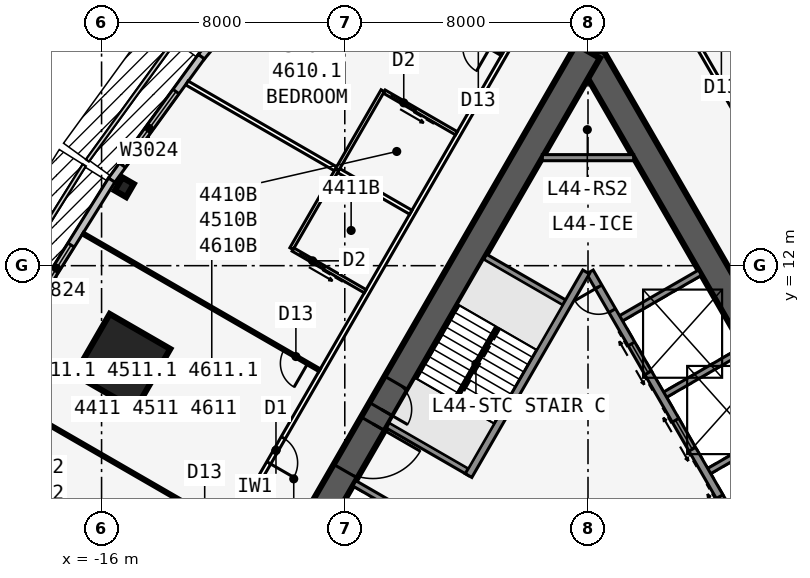
"""IFC4 building model, lengths in metres.
Left out: names, types, materials, properties, quantities, classifications, styles, units other than length and angle.
Written with IfcOpenShell. Run it as: python <this file> out.ifc"""

import sys

from ifc_helpers import new_model, si_unit, direction, frame, frame_2d, origin, origin_2d, place, context, subcontext, project, spatial, rectangle, i_section, extrude, element, fill, save


model = new_model("IFC4")
c1 = context("Model", 3, precision=1e-05, world=origin(), true_north=direction((0.0, 1.0)))
c2 = subcontext(c1, "Body", "Model", "MODEL_VIEW")
j1 = project(units=[si_unit("LENGTHUNIT", "METRE"), si_unit("PLANEANGLEUNIT", "RADIAN")], contexts=[c1])
p1 = place(None, origin())
s1 = spatial("IfcSite", under=j1, at=p1, CompositionType="ELEMENT")
p2 = place(p1, origin())
s2 = spatial("IfcBuilding", under=s1, at=p2, CompositionType="ELEMENT")
p3 = place(p2, frame((0.0, 0.0, 165.7)))
s3 = spatial("IfcBuildingStorey", under=s2, at=p3, CompositionType="ELEMENT", Elevation=165.7)
p4 = place(p3, frame((16.5, -9.526, 0.0), z_axis=(0.0, 0.0, 1.0), x_axis=(-0.499999749417, 0.866025548458, 0.0)))
e1 = element("IfcWall", 1, at=p4, inside=s3, PredefinedType="SHEAR", context=c2, shape_type="SweptSolid", body=[
    extrude(rectangle(XDim=33.0, YDim=0.9, at=frame_2d((16.5, 0.0))), origin(), (0.0, 0.0, 1.0), 3.4),
])
p5 = place(p4, frame((14.15, 0.0, 0.0)))
e2 = element("IfcOpeningElement", 2, at=p5, cuts=e1, PredefinedType="OPENING", context=c2, shape_type="SweptSolid", body=[
    extrude(rectangle(XDim=1.8, YDim=2.13, at=frame_2d((0.9, 1.065))), frame((0.0, 0.46, 0.0), z_axis=(0.0, -1.0, 0.0), x_axis=(1.0, 0.0, 0.0)), (0.0, 0.0, 1.0), 0.92),
])
p6 = place(p4, frame((12.6, 0.0, 0.0)))
e3 = element("IfcOpeningElement", 3, at=p6, cuts=e1, PredefinedType="OPENING", context=c2, shape_type="SweptSolid", body=[
    extrude(rectangle(XDim=1.0, YDim=2.13, at=frame_2d((0.5, 1.065))), frame((0.0, 0.46, 0.0), z_axis=(0.0, -1.0, 0.0), x_axis=(1.0, 0.0, 0.0)), (0.0, 0.0, 1.0), 0.92),
])
p7 = place(p3, frame((5.379, 2.586, 0.0), z_axis=(0.0, 0.0, 1.0), x_axis=(-0.500001375892, 0.866024609411, 0.0)))
e4 = element("IfcWall", 4, at=p7, inside=s3, PredefinedType="SOLIDWALL", context=c2, shape_type="SweptSolid", body=[
    extrude(rectangle(XDim=10.633, YDim=0.25, at=frame_2d((5.316, 0.0))), origin(), (0.0, 0.0, 1.0), 3.235),
])
p8 = place(p7, frame((9.164, 0.0, 0.0)))
e5 = element("IfcOpeningElement", 5, at=p8, cuts=e4, PredefinedType="OPENING", context=c2, shape_type="SweptSolid", body=[
    extrude(rectangle(XDim=0.9, YDim=2.13, at=frame_2d((0.45, 1.065))), frame((0.0, 0.135, 0.0), z_axis=(0.0, -1.0, 0.0), x_axis=(1.0, 0.0, 0.0)), (0.0, 0.0, 1.0), 0.27),
])
p9 = place(p7, frame((1.0, 0.0, 0.0)))
e6 = element("IfcOpeningElement", 6, at=p9, cuts=e4, PredefinedType="OPENING", context=c2, shape_type="SweptSolid", body=[
    extrude(rectangle(XDim=1.1, YDim=2.13, at=frame_2d((0.55, 1.065))), frame((0.0, 0.135, 0.0), z_axis=(0.0, -1.0, 0.0), x_axis=(1.0, 0.0, 0.0)), (0.0, 0.0, 1.0), 0.27),
])
p10 = place(p7, frame((3.9, 0.0, 0.0)))
e7 = element("IfcOpeningElement", 7, at=p10, cuts=e4, PredefinedType="OPENING", context=c2, shape_type="SweptSolid", body=[
    extrude(rectangle(XDim=1.1, YDim=2.13, at=frame_2d((0.55, 1.065))), frame((0.0, 0.135, 0.0), z_axis=(0.0, -1.0, 0.0), x_axis=(1.0, 0.0, 0.0)), (0.0, 0.0, 1.0), 0.27),
])
p11 = place(p7, frame((6.8, 0.0, 0.0)))
e8 = element("IfcOpeningElement", 8, at=p11, cuts=e4, PredefinedType="OPENING", context=c2, shape_type="SweptSolid", body=[
    extrude(rectangle(XDim=1.1, YDim=2.13, at=frame_2d((0.55, 1.065))), frame((0.0, 0.135, 0.0), z_axis=(0.0, -1.0, 0.0), x_axis=(1.0, 0.0, 0.0)), (0.0, 0.0, 1.0), 0.27),
])
for number, where, z_axis, x_axis in (
    (9, (3.879, 5.184, 0.0), (0.0, 0.0, 1.0), (0.866, 0.5, 0.0)),
    (10, (2.429, 7.696, 0.0), (0.0, 0.0, 1.0), (0.866, 0.5, 0.0)),
    (11, (0.979, 10.207, 0.0), (0.0, 0.0, 1.0), (0.866, 0.5, 0.0)),
):
    element("IfcWall", number, at=place(p3, frame(where, z_axis=z_axis, x_axis=x_axis)), inside=s3, PredefinedType="SOLIDWALL", context=c2, shape_type="SweptSolid", body=[
        extrude(rectangle(XDim=3.125, YDim=0.2, at=frame_2d((1.562, 0.0))), origin(), (0.0, 0.0, 1.0), 3.235),
    ])
p12 = place(p3, frame((0.0, 19.052, 0.0), z_axis=(0.0, 0.0, 1.0), x_axis=(-0.499999749417, -0.866025548458, 0.0)))
e12 = element("IfcWall", 12, at=p12, inside=s3, PredefinedType="SHEAR", context=c2, shape_type="SweptSolid", body=[
    extrude(rectangle(XDim=33.0, YDim=0.9, at=frame_2d((16.5, 0.0))), origin(), (0.0, 0.0, 1.0), 3.4),
])
p13 = place(p12, frame((14.15, 0.0, 0.0)))
e13 = element("IfcOpeningElement", 13, at=p13, cuts=e12, PredefinedType="OPENING", context=c2, shape_type="SweptSolid", body=[
    extrude(rectangle(XDim=1.8, YDim=2.13, at=frame_2d((0.9, 1.065))), frame((0.0, 0.46, 0.0), z_axis=(0.0, -1.0, 0.0), x_axis=(1.0, 0.0, 0.0)), (0.0, 0.0, 1.0), 0.92),
])
p14 = place(p12, frame((12.6, 0.0, 0.0)))
e14 = element("IfcOpeningElement", 14, at=p14, cuts=e12, PredefinedType="OPENING", context=c2, shape_type="SweptSolid", body=[
    extrude(rectangle(XDim=1.0, YDim=2.13, at=frame_2d((0.5, 1.065))), frame((0.0, 0.46, 0.0), z_axis=(0.0, -1.0, 0.0), x_axis=(1.0, 0.0, 0.0)), (0.0, 0.0, 1.0), 0.92),
])
p15 = place(p3, frame((-0.062, 11.794, 0.0), z_axis=(0.0, 0.0, 1.0), x_axis=(-0.500006680225, -0.86602154692, 0.0)))
e15 = element("IfcWall", 15, at=p15, inside=s3, PredefinedType="SOLIDWALL", context=c2, shape_type="SweptSolid", body=[
    extrude(rectangle(XDim=7.733, YDim=0.25, at=frame_2d((3.866, 0.0))), origin(), (0.0, 0.0, 1.0), 3.235),
])
for number, where, z_axis, x_axis in (
    (16, (-0.679, 10.727, 0.0), (0.0, 0.0, 1.0), (-0.866, 0.5, 0.0)),
    (17, (-3.879, 5.184, 0.0), (0.0, 0.0, 1.0), (-0.866, 0.5, 0.0)),
    (18, (-4.979, 3.279, 0.0), (0.0, 0.0, 1.0), (-0.866, 0.5, 0.0)),
):
    element("IfcWall", number, at=place(p3, frame(where, z_axis=z_axis, x_axis=x_axis)), inside=s3, PredefinedType="SOLIDWALL", context=c2, shape_type="SweptSolid", body=[
        extrude(rectangle(XDim=3.125, YDim=0.2, at=frame_2d((1.562, 0.0))), origin(), (0.0, 0.0, 1.0), 3.235),
    ])
p16 = place(p3, frame((-15.254, 14.58, 0.0), z_axis=(0.0, 0.0, 1.0), x_axis=(-0.866025403784, 0.5, 0.0)))
e19 = element("IfcColumn", 19, at=p16, inside=s3, PredefinedType="COLUMN", context=c2, shape_type="SweptSolid", body=[
    extrude(i_section(OverallWidth=0.432, OverallDepth=0.498, WebThickness=0.056, FlangeThickness=0.089, at=origin_2d()), origin(), (0.0, 0.0, 1.0), 3.4),
])
p17 = place(p3, frame((-15.312, 8.84, 0.0), z_axis=(0.0, 0.0, 1.0), x_axis=(-0.866025403784, 0.5, 0.0)))
e20 = element("IfcColumn", 20, at=p17, inside=s3, PredefinedType="COLUMN", context=c2, shape_type="SweptSolid", body=[
    extrude(rectangle(XDim=2.3, YDim=2.3, at=origin_2d()), origin(), (0.0, 0.0, 1.0), 3.4),
])
p18 = place(p3, frame((-9.465, 22.76, 0.0), z_axis=(0.0, 0.0, 1.0), x_axis=(-0.641810386606, -0.766863369607, 0.0)))
e21 = element("IfcWall", 21, at=p18, inside=s3, PredefinedType="STANDARD", context=c2, shape_type="SweptSolid", body=[
    extrude(rectangle(XDim=5.076, YDim=0.25, at=frame_2d((2.538, 0.0))), origin(), (0.0, 0.0, 1.0), 3.235),
])
p19 = place(p18, frame((0.738, 0.0, 0.45)))
e22 = element("IfcOpeningElement", 22, at=p19, cuts=e21, PredefinedType="OPENING", context=c2, shape_type="SweptSolid", body=[
    extrude(rectangle(XDim=3.6, YDim=2.4, at=frame_2d((1.8, 1.2))), frame((0.0, 0.135, 0.0), z_axis=(0.0, -1.0, 0.0), x_axis=(1.0, 0.0, 0.0)), (0.0, 0.0, 1.0), 0.27),
])
p20 = place(p3, frame((-12.718, 18.875, 0.0), z_axis=(0.0, 0.0, 1.0), x_axis=(-0.587669188412, -0.809101307001, 0.0)))
e23 = element("IfcWall", 23, at=p20, inside=s3, PredefinedType="STANDARD", context=c2, shape_type="SweptSolid", body=[
    extrude(rectangle(XDim=5.028, YDim=0.25, at=frame_2d((2.514, 0.0))), origin(), (0.0, 0.0, 1.0), 3.235),
])
p21 = place(p20, frame((1.418, 0.0, 0.45)))
e24 = element("IfcOpeningElement", 24, at=p21, cuts=e23, PredefinedType="OPENING", context=c2, shape_type="SweptSolid", body=[
    extrude(rectangle(XDim=3.0, YDim=2.4, at=frame_2d((1.5, 1.2))), frame((0.0, 0.135, 0.0), z_axis=(0.0, -1.0, 0.0), x_axis=(1.0, 0.0, 0.0)), (0.0, 0.0, 1.0), 0.27),
])
p22 = place(p3, frame((-15.667, 14.814, 0.0), z_axis=(0.0, 0.0, 1.0), x_axis=(-0.529990167382, -0.84800378683, 0.0)))
e25 = element("IfcWall", 25, at=p22, inside=s3, PredefinedType="STANDARD", context=c2, shape_type="SweptSolid", body=[
    extrude(rectangle(XDim=5.003, YDim=0.25, at=frame_2d((2.501, 0.0))), origin(), (0.0, 0.0, 1.0), 3.235),
])
p23 = place(p22, frame((2.519, 0.0, 0.45)))
e26 = element("IfcOpeningElement", 26, at=p23, cuts=e25, PredefinedType="OPENING", context=c2, shape_type="SweptSolid", body=[
    extrude(rectangle(XDim=1.8, YDim=2.4, at=frame_2d((0.9, 1.2))), frame((0.0, 0.135, 0.0), z_axis=(0.0, -1.0, 0.0), x_axis=(1.0, 0.0, 0.0)), (0.0, 0.0, 1.0), 0.27),
])
p24 = place(p3, frame((21.586, -11.885, 0.0), z_axis=(0.0, 0.0, 1.0), x_axis=(-0.500001915564, 0.86602429783, 0.0)))
e27 = element("IfcWall", 27, at=p24, inside=s3, PredefinedType="PARTITIONING", context=c2, shape_type="SweptSolid", body=[
    extrude(rectangle(XDim=42.172, YDim=0.15, at=frame_2d((21.086, 0.0))), origin(), (0.0, 0.0, 1.0), 3.235),
])
p25 = place(p24, frame((1.911, 0.0, 0.0)))
e28 = element("IfcOpeningElement", 28, at=p25, cuts=e27, PredefinedType="OPENING", context=c2, shape_type="SweptSolid", body=[
    extrude(rectangle(XDim=0.95, YDim=2.13, at=frame_2d((0.475, 1.065))), frame((0.0, 0.085, 0.0), z_axis=(0.0, -1.0, 0.0), x_axis=(1.0, 0.0, 0.0)), (0.0, 0.0, 1.0), 0.17),
])
p26 = place(p24, frame((9.311, 0.0, 0.0)))
e29 = element("IfcOpeningElement", 29, at=p26, cuts=e27, PredefinedType="OPENING", context=c2, shape_type="SweptSolid", body=[
    extrude(rectangle(XDim=0.95, YDim=2.13, at=frame_2d((0.475, 1.065))), frame((0.0, 0.085, 0.0), z_axis=(0.0, -1.0, 0.0), x_axis=(1.0, 0.0, 0.0)), (0.0, 0.0, 1.0), 0.17),
])
p27 = place(p24, frame((14.611, 0.0, 0.0)))
e30 = element("IfcOpeningElement", 30, at=p27, cuts=e27, PredefinedType="OPENING", context=c2, shape_type="SweptSolid", body=[
    extrude(rectangle(XDim=0.95, YDim=2.13, at=frame_2d((0.475, 1.065))), frame((0.0, 0.085, 0.0), z_axis=(0.0, -1.0, 0.0), x_axis=(1.0, 0.0, 0.0)), (0.0, 0.0, 1.0), 0.17),
])
p28 = place(p24, frame((26.711, 0.0, 0.0)))
e31 = element("IfcOpeningElement", 31, at=p28, cuts=e27, PredefinedType="OPENING", context=c2, shape_type="SweptSolid", body=[
    extrude(rectangle(XDim=0.95, YDim=2.13, at=frame_2d((0.475, 1.065))), frame((0.0, 0.085, 0.0), z_axis=(0.0, -1.0, 0.0), x_axis=(1.0, 0.0, 0.0)), (0.0, 0.0, 1.0), 0.17),
])
p29 = place(p24, frame((38.884, 0.0, 0.0)))
e32 = element("IfcOpeningElement", 32, at=p29, cuts=e27, PredefinedType="OPENING", context=c2, shape_type="SweptSolid", body=[
    extrude(rectangle(XDim=0.95, YDim=2.13, at=frame_2d((0.475, 1.065))), frame((0.0, 0.085, 0.0), z_axis=(0.0, -1.0, 0.0), x_axis=(1.0, 0.0, 0.0)), (0.0, 0.0, 1.0), 0.17),
])
p30 = place(p3, frame((-0.5, 22.836, 0.0), z_axis=(0.0, 0.0, 1.0), x_axis=(-0.500001677587, -0.866024435227, 0.0)))
e33 = element("IfcWall", 33, at=p30, inside=s3, PredefinedType="PARTITIONING", context=c2, shape_type="SweptSolid", body=[
    extrude(rectangle(XDim=39.054, YDim=0.15, at=frame_2d((19.527, 0.0))), origin(), (0.0, 0.0, 1.0), 3.235),
])
p31 = place(p30, frame((1.558, 0.0, 0.0)))
e34 = element("IfcOpeningElement", 34, at=p31, cuts=e33, PredefinedType="OPENING", context=c2, shape_type="SweptSolid", body=[
    extrude(rectangle(XDim=0.95, YDim=2.13, at=frame_2d((0.475, 1.065))), frame((0.0, 0.085, 0.0), z_axis=(0.0, -1.0, 0.0), x_axis=(1.0, 0.0, 0.0)), (0.0, 0.0, 1.0), 0.17),
])
p32 = place(p30, frame((19.052, 0.0, 0.0)))
e35 = element("IfcOpeningElement", 35, at=p32, cuts=e33, PredefinedType="OPENING", context=c2, shape_type="SweptSolid", body=[
    extrude(rectangle(XDim=0.95, YDim=2.13, at=frame_2d((0.475, 1.065))), frame((0.0, 0.085, 0.0), z_axis=(0.0, -1.0, 0.0), x_axis=(1.0, 0.0, 0.0)), (0.0, 0.0, 1.0), 0.17),
])
p33 = place(p30, frame((31.752, 0.0, 0.0)))
e36 = element("IfcOpeningElement", 36, at=p33, cuts=e33, PredefinedType="OPENING", context=c2, shape_type="SweptSolid", body=[
    extrude(rectangle(XDim=0.95, YDim=2.13, at=frame_2d((0.475, 1.065))), frame((0.0, 0.085, 0.0), z_axis=(0.0, -1.0, 0.0), x_axis=(1.0, 0.0, 0.0)), (0.0, 0.0, 1.0), 0.17),
])
p34 = place(p30, frame((37.752, 0.0, 0.0)))
e37 = element("IfcOpeningElement", 37, at=p34, cuts=e33, PredefinedType="OPENING", context=c2, shape_type="SweptSolid", body=[
    extrude(rectangle(XDim=0.95, YDim=2.13, at=frame_2d((0.475, 1.065))), frame((0.0, 0.085, 0.0), z_axis=(0.0, -1.0, 0.0), x_axis=(1.0, 0.0, 0.0)), (0.0, 0.0, 1.0), 0.17),
])
p35 = place(p3, frame((-2.829, 18.954, 0.0), z_axis=(0.0, 0.0, 1.0), x_axis=(-0.866015739374, 0.500016738876, 0.0)))
e38 = element("IfcWall", 38, at=p35, inside=s3, PredefinedType="PARTITIONING", context=c2, shape_type="SweptSolid", body=[
    extrude(rectangle(XDim=7.516, YDim=0.1, at=frame_2d((3.758, 0.0))), origin(), (0.0, 0.0, 1.0), 2.389),
])
p36 = place(p35, frame((0.45, 0.0, 0.0)))
e39 = element("IfcOpeningElement", 39, at=p36, cuts=e38, PredefinedType="OPENING", context=c2, shape_type="SweptSolid", body=[
    extrude(rectangle(XDim=0.9, YDim=2.13, at=frame_2d((0.45, 1.065))), frame((0.0, 0.06, 0.0), z_axis=(0.0, -1.0, 0.0), x_axis=(1.0, 0.0, 0.0)), (0.0, 0.0, 1.0), 0.12),
])
p37 = place(p3, frame((-5.829, 13.757, 0.0), z_axis=(0.0, 0.0, 1.0), x_axis=(-0.866011529155, 0.500024030793, 0.0)))
e40 = element("IfcWall", 40, at=p37, inside=s3, PredefinedType="PARTITIONING", context=c2, shape_type="SweptSolid", body=[
    extrude(rectangle(XDim=8.502, YDim=0.15, at=frame_2d((4.251, 0.0))), origin(), (0.0, 0.0, 1.0), 3.235),
])
p38 = place(p3, frame((-8.829, 8.561, 0.0), z_axis=(0.0, 0.0, 1.0), x_axis=(-0.866021034389, 0.500007567939, 0.0)))
e41 = element("IfcWall", 41, at=p38, inside=s3, PredefinedType="PARTITIONING", context=c2, shape_type="SweptSolid", body=[
    extrude(rectangle(XDim=8.993, YDim=0.1, at=frame_2d((4.497, 0.0))), origin(), (0.0, 0.0, 1.0), 3.235),
])
p39 = place(p38, frame((0.45, 0.0, 0.0)))
e42 = element("IfcOpeningElement", 42, at=p39, cuts=e41, PredefinedType="OPENING", context=c2, shape_type="SweptSolid", body=[
    extrude(rectangle(XDim=0.9, YDim=2.13, at=frame_2d((0.45, 1.065))), frame((0.0, 0.06, 0.0), z_axis=(0.0, -1.0, 0.0), x_axis=(1.0, 0.0, 0.0)), (0.0, 0.0, 1.0), 0.12),
])
p40 = place(p3, frame((-11.829, 3.365, 0.0), z_axis=(0.0, 0.0, 1.0), x_axis=(-0.866009279501, 0.500027927039, 0.0)))
e43 = element("IfcWall", 43, at=p40, inside=s3, PredefinedType="PARTITIONING", context=c2, shape_type="SweptSolid", body=[
    extrude(rectangle(XDim=8.994, YDim=0.1, at=frame_2d((4.497, 0.0))), origin(), (0.0, 0.0, 1.0), 3.235),
])
p41 = place(p40, frame((0.45, 0.0, 0.0)))
e44 = element("IfcOpeningElement", 44, at=p41, cuts=e43, PredefinedType="OPENING", context=c2, shape_type="SweptSolid", body=[
    extrude(rectangle(XDim=0.9, YDim=2.13, at=frame_2d((0.45, 1.065))), frame((0.0, 0.06, 0.0), z_axis=(0.0, -1.0, 0.0), x_axis=(1.0, 0.0, 0.0)), (0.0, 0.0, 1.0), 0.12),
])
p42 = place(p3, frame((-6.753, 17.755, 0.0), z_axis=(0.0, 0.0, 1.0), x_axis=(-0.50002537861, -0.866010750942, 0.0)))
e45 = element("IfcWall", 45, at=p42, inside=s3, PredefinedType="PLUMBINGWALL", context=c2, shape_type="SweptSolid", body=[
    extrude(rectangle(XDim=3.0, YDim=0.12, at=frame_2d((1.5, 0.0))), origin(), (0.0, 0.0, 1.0), 3.235),
])
p43 = place(p3, frame((-4.329, 16.355, 0.0), z_axis=(0.0, 0.0, 1.0), x_axis=(-0.866035715982, 0.499982138324, 0.0)))
e46 = element("IfcWall", 46, at=p43, inside=s3, PredefinedType="PLUMBINGWALL", context=c2, shape_type="SweptSolid", body=[
    extrude(rectangle(XDim=2.74, YDim=0.12, at=frame_2d((1.37, 0.0))), origin(), (0.0, 0.0, 1.0), 3.235),
])
p44 = place(p43, frame((1.55, 0.0, 0.0)))
e47 = element("IfcOpeningElement", 47, at=p44, cuts=e46, PredefinedType="OPENING", context=c2, shape_type="SweptSolid", body=[
    extrude(rectangle(XDim=0.9, YDim=2.13, at=frame_2d((0.45, 1.065))), frame((0.0, 0.07, 0.0), z_axis=(0.0, -1.0, 0.0), x_axis=(1.0, 0.0, 0.0)), (0.0, 0.0, 1.0), 0.14),
])
p45 = place(p3, frame((-8.253, 15.157, 0.0), z_axis=(0.0, 0.0, 1.0), x_axis=(-0.499990139034, -0.866031096941, 0.0)))
e48 = element("IfcWall", 48, at=p45, inside=s3, PredefinedType="PLUMBINGWALL", context=c2, shape_type="SweptSolid", body=[
    extrude(rectangle(XDim=3.0, YDim=0.12, at=frame_2d((1.5, 0.0))), origin(), (0.0, 0.0, 1.0), 3.235),
])
p46 = place(p3, frame((-7.329, 11.159, 0.0), z_axis=(0.0, 0.0, 1.0), x_axis=(-0.865997131366, 0.500048966069, 0.0)))
e49 = element("IfcWall", 49, at=p46, inside=s3, PredefinedType="PLUMBINGWALL", context=c2, shape_type="SweptSolid", body=[
    extrude(rectangle(XDim=2.74, YDim=0.12, at=frame_2d((1.37, 0.0))), origin(), (0.0, 0.0, 1.0), 3.235),
])
p47 = place(p46, frame((1.55, 0.0, 0.0)))
e50 = element("IfcOpeningElement", 50, at=p47, cuts=e49, PredefinedType="OPENING", context=c2, shape_type="SweptSolid", body=[
    extrude(rectangle(XDim=0.9, YDim=2.13, at=frame_2d((0.45, 1.065))), frame((0.0, 0.07, 0.0), z_axis=(0.0, -1.0, 0.0), x_axis=(1.0, 0.0, 0.0)), (0.0, 0.0, 1.0), 0.14),
])
p48 = place(p3, frame((-1.501, 15.552, 0.0), z_axis=(0.0, 0.0, 1.0), x_axis=(1.0, 0.0, 0.0)))
e51 = element("IfcWall", 51, at=p48, inside=s3, PredefinedType="SOLIDWALL", context=c2, shape_type="SweptSolid", body=[
    extrude(rectangle(XDim=3.002, YDim=0.2, at=frame_2d((1.501, 0.0))), origin(), (0.0, 0.0, 1.0), 3.235),
])
p49 = place(p3, frame((-2.988, 9.978, 0.0), z_axis=(0.0, 0.0, 1.0), x_axis=(-0.499992232847, -0.866029888106, 0.0)))
e52 = element("IfcWall", 52, at=p49, inside=s3, PredefinedType="SOLIDWALL", context=c2, shape_type="SweptSolid", body=[
    extrude(rectangle(XDim=2.794, YDim=0.1, at=frame_2d((1.397, 0.0))), origin(), (0.0, 0.0, 1.0), 3.4),
])
p50 = place(p21, origin())
e53 = element("IfcWindow", 53, at=p50, inside=s3, PartitioningType="SINGLE_PANEL", PredefinedType="WINDOW", context=c2, shape_type="SweptSolid", body=[
    extrude(rectangle(XDim=3.0, YDim=2.4, at=frame_2d((1.5, 1.2))), frame((0.0, 0.03, 0.0), z_axis=(0.0, -1.0, 0.0), x_axis=(1.0, 0.0, 0.0)), (0.0, 0.0, 1.0), 0.06),
])
fill(e24, e53)
p51 = place(p23, origin())
e54 = element("IfcWindow", 54, at=p51, inside=s3, PartitioningType="SINGLE_PANEL", PredefinedType="WINDOW", context=c2, shape_type="SweptSolid", body=[
    extrude(rectangle(XDim=1.8, YDim=2.4, at=frame_2d((0.9, 1.2))), frame((0.0, 0.03, 0.0), z_axis=(0.0, -1.0, 0.0), x_axis=(1.0, 0.0, 0.0)), (0.0, 0.0, 1.0), 0.06),
])
fill(e26, e54)
p52 = place(p39, origin())
e55 = element("IfcDoor", 55, at=p52, inside=s3, OperationType="SINGLE_SWING_LEFT", PredefinedType="DOOR", context=c2, shape_type="SweptSolid", body=[
    extrude(rectangle(XDim=0.9, YDim=2.13, at=frame_2d((0.45, 1.065))), frame((0.0, 0.025, 0.0), z_axis=(0.0, -1.0, 0.0), x_axis=(1.0, 0.0, 0.0)), (0.0, 0.0, 1.0), 0.05),
])
fill(e42, e55)
p53 = place(p44, origin())
e56 = element("IfcDoor", 56, at=p53, inside=s3, OperationType="SLIDING_TO_LEFT", PredefinedType="DOOR", context=c2, shape_type="SweptSolid", body=[
    extrude(rectangle(XDim=0.9, YDim=2.13, at=frame_2d((0.45, 1.065))), frame((0.0, 0.025, 0.0), z_axis=(0.0, -1.0, 0.0), x_axis=(1.0, 0.0, 0.0)), (0.0, 0.0, 1.0), 0.05),
])
fill(e47, e56)
p54 = place(p47, origin())
e57 = element("IfcDoor", 57, at=p54, inside=s3, OperationType="SLIDING_TO_LEFT", PredefinedType="DOOR", context=c2, shape_type="SweptSolid", body=[
    extrude(rectangle(XDim=0.9, YDim=2.13, at=frame_2d((0.45, 1.065))), frame((0.0, 0.025, 0.0), z_axis=(0.0, -1.0, 0.0), x_axis=(1.0, 0.0, 0.0)), (0.0, 0.0, 1.0), 0.05),
])
fill(e50, e57)
p55 = place(p32, origin())
e58 = element("IfcDoor", 58, at=p55, inside=s3, OperationType="SINGLE_SWING_RIGHT", PredefinedType="DOOR", context=c2, shape_type="SweptSolid", body=[
    extrude(rectangle(XDim=0.95, YDim=2.13, at=frame_2d((0.475, 1.065))), frame((0.0, 0.025, 0.0), z_axis=(0.0, -1.0, 0.0), x_axis=(1.0, 0.0, 0.0)), (0.0, 0.0, 1.0), 0.05),
])
fill(e35, e58)
p56 = place(p13, origin())
e59 = element("IfcDoor", 59, at=p56, inside=s3, OperationType="DOUBLE_DOOR_SINGLE_SWING", PredefinedType="DOOR", context=c2, shape_type="SweptSolid", body=[
    extrude(rectangle(XDim=1.8, YDim=2.13, at=frame_2d((0.9, 1.065))), frame((0.0, 0.025, 0.0), z_axis=(0.0, -1.0, 0.0), x_axis=(1.0, 0.0, 0.0)), (0.0, 0.0, 1.0), 0.05),
])
fill(e13, e59)
p57 = place(p14, origin())
e60 = element("IfcDoor", 60, at=p57, inside=s3, OperationType="SINGLE_SWING_RIGHT", PredefinedType="DOOR", context=c2, shape_type="SweptSolid", body=[
    extrude(rectangle(XDim=1.0, YDim=2.13, at=frame_2d((0.5, 1.065))), frame((0.0, 0.025, 0.0), z_axis=(0.0, -1.0, 0.0), x_axis=(1.0, 0.0, 0.0)), (0.0, 0.0, 1.0), 0.05),
])
fill(e14, e60)
p58 = place(p8, origin())
e61 = element("IfcDoor", 61, at=p58, inside=s3, OperationType="SINGLE_SWING_RIGHT", PredefinedType="DOOR", context=c2, shape_type="SweptSolid", body=[
    extrude(rectangle(XDim=0.9, YDim=2.13, at=frame_2d((0.45, 1.065))), frame((0.0, 0.025, 0.0), z_axis=(0.0, -1.0, 0.0), x_axis=(1.0, 0.0, 0.0)), (0.0, 0.0, 1.0), 0.05),
])
fill(e5, e61)
p59 = place(p9, origin())
e62 = element("IfcDoor", 62, at=p59, inside=s3, OperationType="DOUBLE_DOOR_SLIDING", PredefinedType="USERDEFINED", context=c2, shape_type="SweptSolid", body=[
    extrude(rectangle(XDim=1.1, YDim=2.13, at=frame_2d((0.55, 1.065))), frame((0.0, 0.025, 0.0), z_axis=(0.0, -1.0, 0.0), x_axis=(1.0, 0.0, 0.0)), (0.0, 0.0, 1.0), 0.05),
])
fill(e6, e62)
p60 = place(p10, origin())
e63 = element("IfcDoor", 63, at=p60, inside=s3, OperationType="DOUBLE_DOOR_SLIDING", PredefinedType="USERDEFINED", context=c2, shape_type="SweptSolid", body=[
    extrude(rectangle(XDim=1.1, YDim=2.13, at=frame_2d((0.55, 1.065))), frame((0.0, 0.025, 0.0), z_axis=(0.0, -1.0, 0.0), x_axis=(1.0, 0.0, 0.0)), (0.0, 0.0, 1.0), 0.05),
])
fill(e7, e63)
p61 = place(p11, origin())
e64 = element("IfcDoor", 64, at=p61, inside=s3, OperationType="DOUBLE_DOOR_SLIDING", PredefinedType="USERDEFINED", context=c2, shape_type="SweptSolid", body=[
    extrude(rectangle(XDim=1.1, YDim=2.13, at=frame_2d((0.55, 1.065))), frame((0.0, 0.025, 0.0), z_axis=(0.0, -1.0, 0.0), x_axis=(1.0, 0.0, 0.0)), (0.0, 0.0, 1.0), 0.05),
])
fill(e8, e64)
save(model, sys.argv[1])
